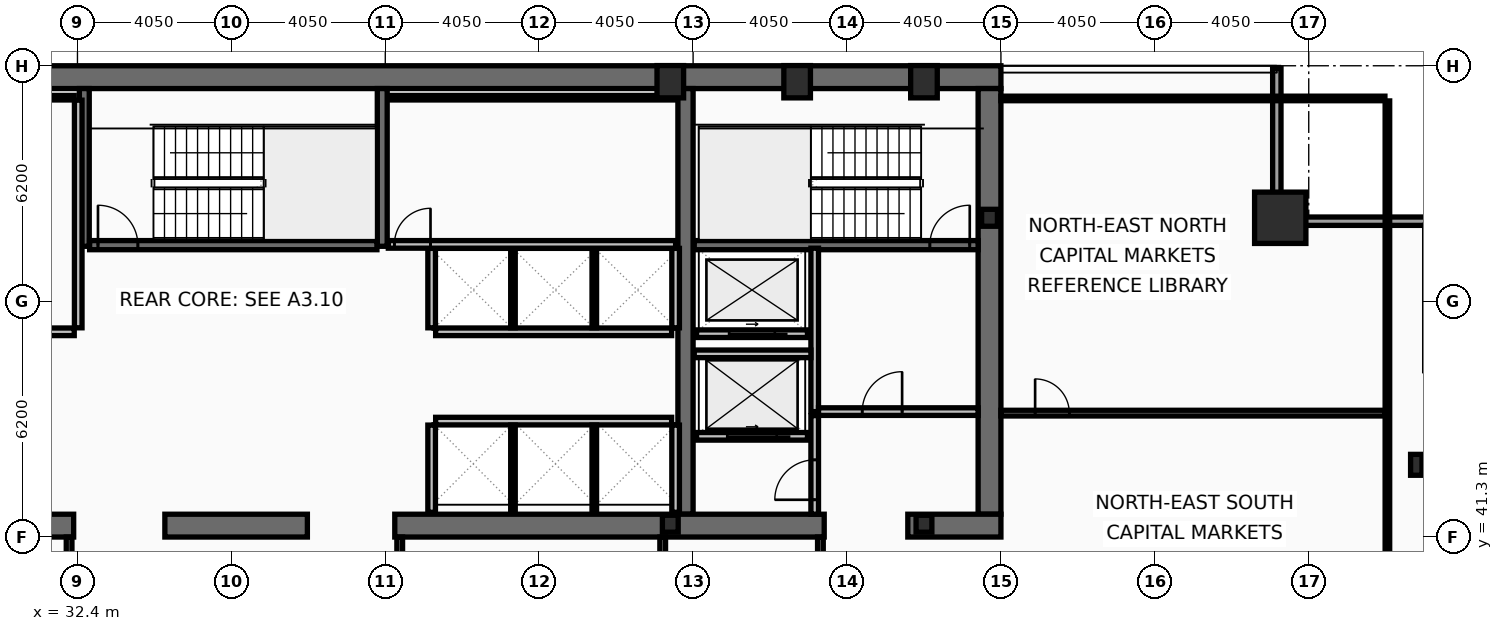
"""IFC4 building model, lengths in metres.
Left out: names, types, materials, properties, quantities, classifications, styles, units other than length and angle.
Written with IfcOpenShell. Run it as: python <this file> out.ifc"""

import sys

from ifc_helpers import new_model, si_unit, direction, frame, frame_2d, origin, origin_2d, place, context, subcontext, project, spatial, rectangle, hollow_rectangle, i_section, extrude, element, fill, save


model = new_model("IFC4")
c1 = context("Model", 3, precision=1e-05, world=origin(), true_north=direction((0.0, 1.0)))
c2 = subcontext(c1, "Body", "Model", "MODEL_VIEW")
j1 = project(units=[si_unit("LENGTHUNIT", "METRE"), si_unit("PLANEANGLEUNIT", "RADIAN")], contexts=[c1])
p1 = place(None, origin())
s1 = spatial("IfcSite", under=j1, at=p1, CompositionType="ELEMENT")
p2 = place(p1, origin())
s2 = spatial("IfcBuilding", under=s1, at=p2, CompositionType="ELEMENT")
p3 = place(p2, frame((0.0, 0.0, 180.6)))
s3 = spatial("IfcBuildingStorey", under=s2, at=p3, CompositionType="ELEMENT", Elevation=180.6)
p4 = place(p3, frame((16.2, 53.4, 0.0), z_axis=(0.0, 0.0, 1.0), x_axis=(1.0, 0.0, 0.0)))
e1 = element("IfcWall", 1, at=p4, inside=s3, PredefinedType="SHEAR", context=c2, shape_type="SweptSolid", body=[
    extrude(rectangle(XDim=40.5, YDim=0.6, at=frame_2d((20.25, 0.0))), origin(), (0.0, 0.0, 1.0), 3.4),
])
p5 = place(p3, frame((56.4, 53.1, 0.0), z_axis=(0.0, 0.0, 1.0), x_axis=(0.0, -1.0, 0.0)))
e2 = element("IfcWall", 2, at=p5, inside=s3, PredefinedType="SHEAR", context=c2, shape_type="SweptSolid", body=[
    extrude(rectangle(XDim=11.2, YDim=0.6, at=frame_2d((5.6, 0.0))), origin(), (0.0, 0.0, 1.0), 3.4),
])
p6 = place(p3, frame((48.4, 41.9, 0.0), z_axis=(0.0, 0.0, 1.0), x_axis=(0.0, 1.0, 0.0)))
e3 = element("IfcWall", 3, at=p6, inside=s3, PredefinedType="SHEAR", context=c2, shape_type="SweptSolid", body=[
    extrude(rectangle(XDim=11.2, YDim=0.4, at=frame_2d((5.6, 0.0))), origin(), (0.0, 0.0, 1.0), 3.4),
])
p7 = place(p3, frame((32.3, 41.6, 0.0), z_axis=(0.0, 0.0, 1.0), x_axis=(-1.0, 0.0, 0.0)))
e4 = element("IfcWall", 4, at=p7, inside=s3, PredefinedType="SHEAR", context=c2, shape_type="SweptSolid", body=[
    extrude(rectangle(XDim=11.45, YDim=0.6, at=frame_2d((5.725, 0.0))), origin(), (0.0, 0.0, 1.0), 3.4),
])
p8 = place(p3, frame((38.45, 41.6, 0.0), z_axis=(0.0, 0.0, 1.0), x_axis=(-1.0, 0.0, 0.0)))
e5 = element("IfcWall", 5, at=p8, inside=s3, PredefinedType="SHEAR", context=c2, shape_type="SweptSolid", body=[
    extrude(rectangle(XDim=3.75, YDim=0.6, at=frame_2d((1.875, 0.0))), origin(), (0.0, 0.0, 1.0), 3.4),
])
p9 = place(p3, frame((52.05, 41.6, 0.0), z_axis=(0.0, 0.0, 1.0), x_axis=(-1.0, 0.0, 0.0)))
e6 = element("IfcWall", 6, at=p9, inside=s3, PredefinedType="SHEAR", context=c2, shape_type="SweptSolid", body=[
    extrude(rectangle(XDim=11.3, YDim=0.6, at=frame_2d((5.65, 0.0))), origin(), (0.0, 0.0, 1.0), 3.4),
])
p10 = place(p3, frame((56.7, 41.6, 0.0), z_axis=(0.0, 0.0, 1.0), x_axis=(-1.0, 0.0, 0.0)))
e7 = element("IfcWall", 7, at=p10, inside=s3, PredefinedType="SHEAR", context=c2, shape_type="SweptSolid", body=[
    extrude(rectangle(XDim=2.45, YDim=0.6, at=frame_2d((1.225, 0.0))), origin(), (0.0, 0.0, 1.0), 3.4),
])
for number, where, z_axis, x_axis in (
    (8, (32.58, 48.95, 0.0), (0.0, 0.0, 1.0), (0.0, 1.0, 0.0)),
    (9, (40.42, 48.95, 0.0), (0.0, 0.0, 1.0), (0.0, 1.0, 0.0)),
):
    element("IfcWall", number, at=place(p3, frame(where, z_axis=z_axis, x_axis=x_axis)), inside=s3, PredefinedType="SHEAR", context=c2, shape_type="SweptSolid", body=[
        extrude(rectangle(XDim=4.15, YDim=0.26, at=frame_2d((2.075, 0.0))), origin(), (0.0, 0.0, 1.0), 3.4),
    ])
p11 = place(p3, frame((48.63, 48.98, 0.0), z_axis=(0.0, 0.0, 1.0), x_axis=(1.0, 0.0, 0.0)))
e10 = element("IfcWall", 10, at=p11, inside=s3, PredefinedType="SHEAR", context=c2, shape_type="SweptSolid", body=[
    extrude(rectangle(XDim=7.47, YDim=0.24, at=frame_2d((3.735, 0.0))), origin(), (0.0, 0.0, 1.0), 3.4),
])
p12 = place(p11, frame((6.2, 0.0, 0.0)))
e11 = element("IfcOpeningElement", 11, at=p12, cuts=e10, PredefinedType="OPENING", context=c2, shape_type="SweptSolid", body=[
    extrude(rectangle(XDim=1.05, YDim=2.15, at=frame_2d((0.525, 1.075))), frame((0.0, 0.13, 0.0), z_axis=(0.0, -1.0, 0.0), x_axis=(1.0, 0.0, 0.0)), (0.0, 0.0, 1.0), 0.26),
])
p13 = place(p3, frame((32.72, 48.98, 0.0), z_axis=(0.0, 0.0, 1.0), x_axis=(1.0, 0.0, 0.0)))
e12 = element("IfcWall", 12, at=p13, inside=s3, PredefinedType="SHEAR", context=c2, shape_type="SweptSolid", body=[
    extrude(rectangle(XDim=7.56, YDim=0.24, at=frame_2d((3.78, 0.0))), origin(), (0.0, 0.0, 1.0), 3.4),
])
p14 = place(p13, frame((0.22, 0.0, 0.0)))
e13 = element("IfcOpeningElement", 13, at=p14, cuts=e12, PredefinedType="OPENING", context=c2, shape_type="SweptSolid", body=[
    extrude(rectangle(XDim=1.05, YDim=2.15, at=frame_2d((0.525, 1.075))), frame((0.0, 0.13, 0.0), z_axis=(0.0, -1.0, 0.0), x_axis=(1.0, 0.0, 0.0)), (0.0, 0.0, 1.0), 0.26),
])
p15 = place(p3, frame((64.05, 49.7, 0.0), z_axis=(0.0, 0.0, 1.0), x_axis=(1.0, 0.0, 0.0)))
e14 = element("IfcColumn", 14, at=p15, inside=s3, PredefinedType="COLUMN", context=c2, shape_type="SweptSolid", body=[
    extrude(hollow_rectangle(XDim=1.35, YDim=1.35, WallThickness=0.065, at=origin_2d()), origin(), (0.0, 0.0, 1.0), 3.6),
])
for number, where, z_axis, x_axis in (
    (15, (48.0, 53.28, 0.0), (0.0, 0.0, 1.0), (1.0, 0.0, 0.0)),
    (16, (51.337, 53.28, 0.0), (0.0, 0.0, 1.0), (1.0, 0.0, 0.0)),
    (17, (54.675, 53.28, 0.0), (0.0, 0.0, 1.0), (1.0, 0.0, 0.0)),
):
    element("IfcColumn", number, at=place(p3, frame(where, z_axis=z_axis, x_axis=x_axis)), inside=s3, PredefinedType="COLUMN", context=c2, shape_type="SweptSolid", body=[
        extrude(hollow_rectangle(XDim=0.7, YDim=0.85, WallThickness=0.05, at=origin_2d()), origin(), (0.0, 0.0, 1.0), 3.6),
    ])
p16 = place(p3, frame((67.63, 43.2, 0.0), z_axis=(0.0, 0.0, 1.0), x_axis=(1.0, 0.0, 0.0)))
e18 = element("IfcColumn", 18, at=p16, inside=s3, PredefinedType="COLUMN", context=c2, shape_type="SweptSolid", body=[
    extrude(i_section(OverallWidth=0.3, OverallDepth=0.55, WebThickness=0.015, FlangeThickness=0.029, at=origin_2d()), origin(), (0.0, 0.0, 1.0), 3.6),
])
for number, where, z_axis, x_axis in (
    (19, (56.4, 49.7, 0.0), (0.0, 0.0, 1.0), (1.0, 0.0, 0.0)),
    (20, (48.0, 41.65, 0.0), (0.0, 0.0, 1.0), (1.0, 0.0, 0.0)),
    (21, (54.675, 41.65, 0.0), (0.0, 0.0, 1.0), (1.0, 0.0, 0.0)),
):
    element("IfcColumn", number, at=place(p3, frame(where, z_axis=z_axis, x_axis=x_axis)), inside=s3, PredefinedType="COLUMN", context=c2, shape_type="SweptSolid", body=[
        extrude(i_section(OverallWidth=0.416, OverallDepth=0.446, WebThickness=0.039, FlangeThickness=0.063, at=origin_2d()), origin(), (0.0, 0.0, 1.0), 3.6),
    ])
p17 = place(p3, frame((63.96, 53.63, 0.0), z_axis=(0.0, 0.0, 1.0), x_axis=(0.0, -1.0, 0.0)))
e22 = element("IfcWall", 22, at=p17, inside=s3, PredefinedType="SOLIDWALL", context=c2, shape_type="SweptSolid", body=[
    extrude(rectangle(XDim=3.91, YDim=0.22, at=frame_2d((1.955, 0.0))), origin(), (0.0, 0.0, 1.0), 2.79),
])
p18 = place(p3, frame((63.85, 49.61, 0.0), z_axis=(0.0, 0.0, 1.0), x_axis=(1.0, 0.0, 0.0)))
e23 = element("IfcWall", 23, at=p18, inside=s3, PredefinedType="SOLIDWALL", context=c2, shape_type="SweptSolid", body=[
    extrude(rectangle(XDim=4.22, YDim=0.22, at=frame_2d((2.11, 0.0))), origin(), (0.0, 0.0, 1.0), 2.79),
])
p19 = place(p3, frame((51.61, 43.95, 0.0), z_axis=(0.0, 0.0, 1.0), x_axis=(-1.0, 0.0, 0.0)))
e24 = element("IfcWall", 24, at=p19, inside=s3, PredefinedType="PARTITIONING", context=c2, shape_type="SweptSolid", body=[
    extrude(rectangle(XDim=2.92, YDim=0.2, at=frame_2d((1.46, 0.0))), origin(), (0.0, 0.0, 1.0), 3.4),
])
p20 = place(p19, frame((0.81, 0.0, 0.0)))
e25 = element("IfcOpeningElement", 25, at=p20, cuts=e24, PredefinedType="OPENING", context=c2, shape_type="SweptSolid", body=[
    extrude(rectangle(XDim=1.3, YDim=2.18, at=frame_2d((0.65, 1.09))), frame((0.0, 0.11, 0.0), z_axis=(0.0, -1.0, 0.0), x_axis=(1.0, 0.0, 0.0)), (0.0, 0.0, 1.0), 0.22),
])
p21 = place(p3, frame((51.61, 46.65, 0.0), z_axis=(0.0, 0.0, 1.0), x_axis=(-1.0, 0.0, 0.0)))
e26 = element("IfcWall", 26, at=p21, inside=s3, PredefinedType="PARTITIONING", context=c2, shape_type="SweptSolid", body=[
    extrude(rectangle(XDim=2.92, YDim=0.2, at=frame_2d((1.46, 0.0))), origin(), (0.0, 0.0, 1.0), 3.4),
])
p22 = place(p21, frame((0.86, 0.0, 0.0)))
e27 = element("IfcOpeningElement", 27, at=p22, cuts=e26, PredefinedType="OPENING", context=c2, shape_type="SweptSolid", body=[
    extrude(rectangle(XDim=1.2, YDim=2.18, at=frame_2d((0.6, 1.09))), frame((0.0, 0.11, 0.0), z_axis=(0.0, -1.0, 0.0), x_axis=(1.0, 0.0, 0.0)), (0.0, 0.0, 1.0), 0.22),
])
p23 = place(p3, frame((51.8, 44.6, 0.0), z_axis=(0.0, 0.0, 1.0), x_axis=(0.0, 1.0, 0.0)))
e28 = element("IfcWall", 28, at=p23, inside=s3, PredefinedType="PARTITIONING", context=c2, shape_type="SweptSolid", body=[
    extrude(rectangle(XDim=4.3, YDim=0.2, at=frame_2d((2.15, 0.0))), origin(), (0.0, 0.0, 1.0), 3.4),
])
p24 = place(p3, frame((51.9, 44.6, 0.0), z_axis=(0.0, 0.0, 1.0), x_axis=(1.0, 0.0, 0.0)))
e29 = element("IfcWall", 29, at=p24, inside=s3, PredefinedType="PARTITIONING", context=c2, shape_type="SweptSolid", body=[
    extrude(rectangle(XDim=4.2, YDim=0.2, at=frame_2d((2.1, 0.0))), origin(), (0.0, 0.0, 1.0), 3.4),
])
p25 = place(p24, frame((1.15, 0.0, 0.0)))
e30 = element("IfcOpeningElement", 30, at=p25, cuts=e29, PredefinedType="OPENING", context=c2, shape_type="SweptSolid", body=[
    extrude(rectangle(XDim=1.05, YDim=2.15, at=frame_2d((0.525, 1.075))), frame((0.0, 0.11, 0.0), z_axis=(0.0, -1.0, 0.0), x_axis=(1.0, 0.0, 0.0)), (0.0, 0.0, 1.0), 0.22),
])
p26 = place(p3, frame((48.63, 46.12, 0.0), z_axis=(0.0, 0.0, 1.0), x_axis=(1.0, 0.0, 0.0)))
e31 = element("IfcWall", 31, at=p26, inside=s3, PredefinedType="PARTITIONING", context=c2, shape_type="SweptSolid", body=[
    extrude(rectangle(XDim=3.07, YDim=0.2, at=frame_2d((1.535, 0.0))), origin(), (0.0, 0.0, 1.0), 3.4),
])
p27 = place(p3, frame((51.8, 41.9, 0.0), z_axis=(0.0, 0.0, 1.0), x_axis=(0.0, 1.0, 0.0)))
e32 = element("IfcWall", 32, at=p27, inside=s3, PredefinedType="PARTITIONING", context=c2, shape_type="SweptSolid", body=[
    extrude(rectangle(XDim=2.595, YDim=0.2, at=frame_2d((1.298, 0.0))), origin(), (0.0, 0.0, 1.0), 3.4),
])
p28 = place(p27, frame((0.38, 0.0, 0.0)))
e33 = element("IfcOpeningElement", 33, at=p28, cuts=e32, PredefinedType="OPENING", context=c2, shape_type="SweptSolid", body=[
    extrude(rectangle(XDim=1.05, YDim=2.15, at=frame_2d((0.525, 1.075))), frame((0.0, 0.11, 0.0), z_axis=(0.0, -1.0, 0.0), x_axis=(1.0, 0.0, 0.0)), (0.0, 0.0, 1.0), 0.22),
])
p29 = place(p3, frame((32.42, 46.805, 0.0), z_axis=(0.0, 0.0, 1.0), x_axis=(0.0, 1.0, 0.0)))
e34 = element("IfcWall", 34, at=p29, inside=s3, PredefinedType="PARTITIONING", context=c2, shape_type="SweptSolid", body=[
    extrude(rectangle(XDim=5.99, YDim=0.2, at=frame_2d((2.995, 0.0))), origin(), (0.0, 0.0, 1.0), 3.4),
])
p30 = place(p3, frame((24.805, 52.86, 0.0), z_axis=(0.0, 0.0, 1.0), x_axis=(1.0, 0.0, 0.0)))
e35 = element("IfcWall", 35, at=p30, inside=s3, PredefinedType="PARTITIONING", context=c2, shape_type="SweptSolid", body=[
    extrude(rectangle(XDim=7.51, YDim=0.12, at=frame_2d((3.755, 0.0))), origin(), (0.0, 0.0, 1.0), 3.4),
])
p31 = place(p3, frame((24.805, 46.7, 0.0), z_axis=(0.0, 0.0, 1.0), x_axis=(1.0, 0.0, 0.0)))
e36 = element("IfcWall", 36, at=p31, inside=s3, PredefinedType="PARTITIONING", context=c2, shape_type="SweptSolid", body=[
    extrude(rectangle(XDim=7.51, YDim=0.2, at=frame_2d((3.755, 0.0))), origin(), (0.0, 0.0, 1.0), 3.4),
])
p32 = place(p31, frame((0.55, 0.0, 0.0)))
e37 = element("IfcOpeningElement", 37, at=p32, cuts=e36, PredefinedType="OPENING", context=c2, shape_type="SweptSolid", body=[
    extrude(rectangle(XDim=0.95, YDim=2.1, at=frame_2d((0.475, 1.05))), frame((0.0, 0.11, 0.0), z_axis=(0.0, -1.0, 0.0), x_axis=(1.0, 0.0, 0.0)), (0.0, 0.0, 1.0), 0.22),
])
p33 = place(p31, frame((3.784, 0.0, 0.0)))
e38 = element("IfcOpeningElement", 38, at=p33, cuts=e36, PredefinedType="OPENING", context=c2, shape_type="SweptSolid", body=[
    extrude(rectangle(XDim=0.95, YDim=2.1, at=frame_2d((0.475, 1.05))), frame((0.0, 0.11, 0.0), z_axis=(0.0, -1.0, 0.0), x_axis=(1.0, 0.0, 0.0)), (0.0, 0.0, 1.0), 0.22),
])
p34 = place(p3, frame((41.825, 46.7, 0.0), z_axis=(0.0, 0.0, 1.0), x_axis=(1.0, 0.0, 0.0)))
e39 = element("IfcWall", 39, at=p34, inside=s3, PredefinedType="PARTITIONING", context=c2, shape_type="SweptSolid", body=[
    extrude(rectangle(XDim=6.21, YDim=0.2, at=frame_2d((3.105, 0.0))), origin(), (0.0, 0.0, 1.0), 3.4),
])
for number, where, z_axis, x_axis in (
    (40, (41.72, 46.805, 0.0), (0.0, 0.0, 1.0), (0.0, 1.0, 0.0)),
    (41, (48.14, 46.805, 0.0), (0.0, 0.0, 1.0), (0.0, 1.0, 0.0)),
):
    element("IfcWall", number, at=place(p3, frame(where, z_axis=z_axis, x_axis=x_axis)), inside=s3, PredefinedType="PARTITIONING", context=c2, shape_type="SweptSolid", body=[
        extrude(rectangle(XDim=2.09, YDim=0.2, at=frame_2d((1.045, 0.0))), origin(), (0.0, 0.0, 1.0), 3.4),
    ])
for number, where, z_axis, x_axis in (
    (42, (43.86, 46.805, 0.0), (0.0, 0.0, 1.0), (0.0, 1.0, 0.0)),
    (43, (46.0, 46.805, 0.0), (0.0, 0.0, 1.0), (0.0, 1.0, 0.0)),
):
    element("IfcWall", number, at=place(p3, frame(where, z_axis=z_axis, x_axis=x_axis)), inside=s3, PredefinedType="PARTITIONING", context=c2, shape_type="SweptSolid", body=[
        extrude(rectangle(XDim=2.09, YDim=0.12, at=frame_2d((1.045, 0.0))), origin(), (0.0, 0.0, 1.0), 3.4),
    ])
p35 = place(p3, frame((41.825, 44.35, 0.0), z_axis=(0.0, 0.0, 1.0), x_axis=(1.0, 0.0, 0.0)))
e44 = element("IfcWall", 44, at=p35, inside=s3, PredefinedType="PARTITIONING", context=c2, shape_type="SweptSolid", body=[
    extrude(rectangle(XDim=6.21, YDim=0.2, at=frame_2d((3.105, 0.0))), origin(), (0.0, 0.0, 1.0), 3.4),
])
for number, where, z_axis, x_axis in (
    (45, (41.72, 41.95, 0.0), (0.0, 0.0, 1.0), (0.0, 1.0, 0.0)),
    (46, (48.14, 41.95, 0.0), (0.0, 0.0, 1.0), (0.0, 1.0, 0.0)),
):
    element("IfcWall", number, at=place(p3, frame(where, z_axis=z_axis, x_axis=x_axis)), inside=s3, PredefinedType="PARTITIONING", context=c2, shape_type="SweptSolid", body=[
        extrude(rectangle(XDim=2.295, YDim=0.2, at=frame_2d((1.147, 0.0))), origin(), (0.0, 0.0, 1.0), 3.4),
    ])
for number, where, z_axis, x_axis in (
    (47, (43.86, 41.95, 0.0), (0.0, 0.0, 1.0), (0.0, 1.0, 0.0)),
    (48, (46.0, 41.95, 0.0), (0.0, 0.0, 1.0), (0.0, 1.0, 0.0)),
):
    element("IfcWall", number, at=place(p3, frame(where, z_axis=z_axis, x_axis=x_axis)), inside=s3, PredefinedType="PARTITIONING", context=c2, shape_type="SweptSolid", body=[
        extrude(rectangle(XDim=2.295, YDim=0.12, at=frame_2d((1.147, 0.0))), origin(), (0.0, 0.0, 1.0), 3.4),
    ])
p36 = place(p3, frame((40.58, 52.86, 0.0), z_axis=(0.0, 0.0, 1.0), x_axis=(1.0, 0.0, 0.0)))
e49 = element("IfcWall", 49, at=p36, inside=s3, PredefinedType="PARTITIONING", context=c2, shape_type="SweptSolid", body=[
    extrude(rectangle(XDim=7.56, YDim=0.12, at=frame_2d((3.78, 0.0))), origin(), (0.0, 0.0, 1.0), 3.4),
])
p37 = place(p3, frame((40.58, 49.0, 0.0), z_axis=(0.0, 0.0, 1.0), x_axis=(1.0, 0.0, 0.0)))
e50 = element("IfcWall", 50, at=p37, inside=s3, PredefinedType="PARTITIONING", context=c2, shape_type="SweptSolid", body=[
    extrude(rectangle(XDim=7.56, YDim=0.2, at=frame_2d((3.78, 0.0))), origin(), (0.0, 0.0, 1.0), 3.4),
])
p38 = place(p37, frame((0.16, 0.0, 0.0)))
e51 = element("IfcOpeningElement", 51, at=p38, cuts=e50, PredefinedType="OPENING", context=c2, shape_type="SweptSolid", body=[
    extrude(rectangle(XDim=0.95, YDim=2.1, at=frame_2d((0.475, 1.05))), frame((0.0, 0.11, 0.0), z_axis=(0.0, -1.0, 0.0), x_axis=(1.0, 0.0, 0.0)), (0.0, 0.0, 1.0), 0.22),
])
for number, where, z_axis, x_axis in (
    (52, (32.18, 38.28, 0.0), (0.0, 0.0, 1.0), (0.0, 1.0, 0.0)),
    (53, (40.88, 38.28, 0.0), (0.0, 0.0, 1.0), (0.0, 1.0, 0.0)),
):
    element("IfcWall", number, at=place(p3, frame(where, z_axis=z_axis, x_axis=x_axis)), inside=s3, PredefinedType="PARTITIONING", context=c2, shape_type="SweptSolid", body=[
        extrude(rectangle(XDim=3.02, YDim=0.15, at=frame_2d((1.51, 0.0))), origin(), (0.0, 0.0, 1.0), 3.4),
    ])
p39 = place(p3, frame((47.8, 38.28, 0.0), z_axis=(0.0, 0.0, 1.0), x_axis=(0.0, 1.0, 0.0)))
e54 = element("IfcWall", 54, at=p39, inside=s3, PredefinedType="PARTITIONING", context=c2, shape_type="SweptSolid", body=[
    extrude(rectangle(XDim=3.02, YDim=0.15, at=frame_2d((1.51, 0.0))), origin(), (0.0, 0.0, 1.0), 2.69),
])
p40 = place(p3, frame((51.95, 38.28, 0.0), z_axis=(0.0, 0.0, 1.0), x_axis=(0.0, 1.0, 0.0)))
e55 = element("IfcWall", 55, at=p40, inside=s3, PredefinedType="PARTITIONING", context=c2, shape_type="SweptSolid", body=[
    extrude(rectangle(XDim=3.02, YDim=0.15, at=frame_2d((1.51, 0.0))), origin(), (0.0, 0.0, 1.0), 3.4),
])
p41 = place(p3, frame((56.7, 44.56, 0.0), z_axis=(0.0, 0.0, 1.0), x_axis=(1.0, 0.0, 0.0)))
e56 = element("IfcWall", 56, at=p41, inside=s3, PredefinedType="PARTITIONING", context=c2, shape_type="SweptSolid", body=[
    extrude(rectangle(XDim=10.105, YDim=0.15, at=frame_2d((5.052, 0.0))), origin(), (0.0, 0.0, 1.0), 2.79),
])
p42 = place(p41, frame((0.9, 0.0, 0.0)))
e57 = element("IfcOpeningElement", 57, at=p42, cuts=e56, PredefinedType="OPENING", context=c2, shape_type="SweptSolid", body=[
    extrude(rectangle(XDim=0.9, YDim=2.05, at=frame_2d((0.45, 1.025))), frame((0.0, 0.085, 0.0), z_axis=(0.0, -1.0, 0.0), x_axis=(1.0, 0.0, 0.0)), (0.0, 0.0, 1.0), 0.17),
])
p43 = place(p3, frame((66.87, 10.665, 0.0), z_axis=(0.0, 0.0, 1.0), x_axis=(0.0, 1.0, 0.0)))
e58 = element("IfcWall", 58, at=p43, inside=s3, PredefinedType="PARTITIONING", context=c2, shape_type="SweptSolid", body=[
    extrude(rectangle(XDim=42.11, YDim=0.12, at=frame_2d((21.055, 0.0))), origin(), (0.0, 0.0, 1.0), 2.69),
])
p44 = place(p3, frame((56.7, 52.84, 0.0), z_axis=(0.0, 0.0, 1.0), x_axis=(1.0, 0.0, 0.0)))
e59 = element("IfcWall", 59, at=p44, inside=s3, PredefinedType="PARTITIONING", context=c2, shape_type="SweptSolid", body=[
    extrude(rectangle(XDim=10.105, YDim=0.12, at=frame_2d((5.052, 0.0))), origin(), (0.0, 0.0, 1.0), 3.4),
])
p45 = place(p12, origin())
e60 = element("IfcDoor", 60, at=p45, inside=s3, OperationType="SINGLE_SWING_RIGHT", PredefinedType="DOOR", context=c2, shape_type="SweptSolid", body=[
    extrude(rectangle(XDim=1.05, YDim=2.15, at=frame_2d((0.525, 1.075))), frame((0.0, 0.025, 0.0), z_axis=(0.0, -1.0, 0.0), x_axis=(1.0, 0.0, 0.0)), (0.0, 0.0, 1.0), 0.05),
])
fill(e11, e60)
p46 = place(p14, origin())
e61 = element("IfcDoor", 61, at=p46, inside=s3, OperationType="SINGLE_SWING_LEFT", PredefinedType="DOOR", context=c2, shape_type="SweptSolid", body=[
    extrude(rectangle(XDim=1.05, YDim=2.15, at=frame_2d((0.525, 1.075))), frame((0.0, 0.025, 0.0), z_axis=(0.0, -1.0, 0.0), x_axis=(1.0, 0.0, 0.0)), (0.0, 0.0, 1.0), 0.05),
])
fill(e13, e61)
p47 = place(p20, origin())
e62 = element("IfcDoor", 62, at=p47, inside=s3, OperationType="SLIDING_TO_LEFT", PredefinedType="DOOR", context=c2, shape_type="SweptSolid", body=[
    extrude(rectangle(XDim=1.3, YDim=2.18, at=frame_2d((0.65, 1.09))), frame((0.0, 0.025, 0.0), z_axis=(0.0, -1.0, 0.0), x_axis=(1.0, 0.0, 0.0)), (0.0, 0.0, 1.0), 0.05),
])
fill(e25, e62)
p48 = place(p22, origin())
e63 = element("IfcDoor", 63, at=p48, inside=s3, OperationType="SLIDING_TO_LEFT", PredefinedType="DOOR", context=c2, shape_type="SweptSolid", body=[
    extrude(rectangle(XDim=1.2, YDim=2.18, at=frame_2d((0.6, 1.09))), frame((0.0, 0.025, 0.0), z_axis=(0.0, -1.0, 0.0), x_axis=(1.0, 0.0, 0.0)), (0.0, 0.0, 1.0), 0.05),
])
fill(e27, e63)
p49 = place(p25, origin())
e64 = element("IfcDoor", 64, at=p49, inside=s3, OperationType="SINGLE_SWING_RIGHT", PredefinedType="DOOR", context=c2, shape_type="SweptSolid", body=[
    extrude(rectangle(XDim=1.05, YDim=2.15, at=frame_2d((0.525, 1.075))), frame((0.0, 0.025, 0.0), z_axis=(0.0, -1.0, 0.0), x_axis=(1.0, 0.0, 0.0)), (0.0, 0.0, 1.0), 0.05),
])
fill(e30, e64)
p50 = place(p28, origin())
e65 = element("IfcDoor", 65, at=p50, inside=s3, OperationType="SINGLE_SWING_LEFT", PredefinedType="DOOR", context=c2, shape_type="SweptSolid", body=[
    extrude(rectangle(XDim=1.05, YDim=2.15, at=frame_2d((0.525, 1.075))), frame((0.0, 0.025, 0.0), z_axis=(0.0, -1.0, 0.0), x_axis=(1.0, 0.0, 0.0)), (0.0, 0.0, 1.0), 0.05),
])
fill(e33, e65)
p51 = place(p38, origin())
e66 = element("IfcDoor", 66, at=p51, inside=s3, OperationType="SINGLE_SWING_RIGHT", PredefinedType="DOOR", context=c2, shape_type="SweptSolid", body=[
    extrude(rectangle(XDim=0.95, YDim=2.1, at=frame_2d((0.475, 1.05))), frame((0.0, 0.025, 0.0), z_axis=(0.0, -1.0, 0.0), x_axis=(1.0, 0.0, 0.0)), (0.0, 0.0, 1.0), 0.05),
])
fill(e51, e66)
p52 = place(p42, origin())
e67 = element("IfcDoor", 67, at=p52, inside=s3, OperationType="SINGLE_SWING_LEFT", PredefinedType="DOOR", context=c2, shape_type="SweptSolid", body=[
    extrude(rectangle(XDim=0.9, YDim=2.05, at=frame_2d((0.45, 1.025))), frame((0.0, 0.025, 0.0), z_axis=(0.0, -1.0, 0.0), x_axis=(1.0, 0.0, 0.0)), (0.0, 0.0, 1.0), 0.05),
])
fill(e57, e67)
save(model, sys.argv[1])
